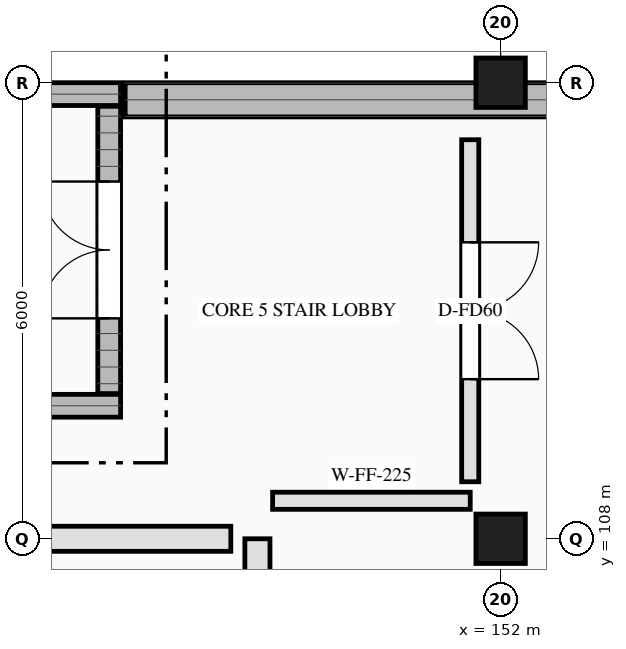
"""IFC4 building model, lengths in metres.
Left out: names, types, materials, properties, quantities, classifications, styles, units other than length and angle.
Written with IfcOpenShell. Run it as: python <this file> out.ifc"""

import sys

from ifc_helpers import new_model, si_unit, direction, frame, frame_2d, origin, origin_2d, place, context, subcontext, project, spatial, rectangle, extrude, element, fill, save


model = new_model("IFC4")
c1 = context("Model", 3, precision=1e-05, world=origin(), true_north=direction((0.0, 1.0)))
c2 = subcontext(c1, "Body", "Model", "MODEL_VIEW")
j1 = project(units=[si_unit("LENGTHUNIT", "METRE"), si_unit("PLANEANGLEUNIT", "RADIAN")], contexts=[c1])
p1 = place(None, origin())
s1 = spatial("IfcSite", under=j1, at=p1, CompositionType="ELEMENT")
p2 = place(p1, origin())
s2 = spatial("IfcBuilding", under=s1, at=p2, CompositionType="ELEMENT")
p3 = place(p2, frame((0.0, 0.0, -5.4)))
s3 = spatial("IfcBuildingStorey", under=s2, at=p3, CompositionType="ELEMENT", Elevation=-5.4)
p4 = place(p3, frame((147.06, 113.775, -0.4), z_axis=(0.0, 0.0, 1.0), x_axis=(1.0, 0.0, 0.0)))
e1 = element("IfcWall", 1, at=p4, inside=s3, PredefinedType="USERDEFINED", context=c2, shape_type="SweptSolid", body=[
    extrude(rectangle(XDim=20.715, YDim=0.45, at=frame_2d((10.357, 0.0))), origin(), (0.0, 0.0, 1.0), 5.5),
])
for number, where, z_axis, x_axis in (
    (2, (137.0, 109.75, -0.4), (0.0, 0.0, 1.0), (1.0, 0.0, 0.0)),
    (3, (137.0, 113.85, -0.4), (0.0, 0.0, 1.0), (1.0, 0.0, 0.0)),
):
    element("IfcWall", number, at=place(p3, frame(where, z_axis=z_axis, x_axis=x_axis)), inside=s3, PredefinedType="SHEAR", context=c2, shape_type="SweptSolid", body=[
        extrude(rectangle(XDim=10.0, YDim=0.3, at=frame_2d((5.0, 0.0))), origin(), (0.0, 0.0, 1.0), 5.8),
    ])
p5 = place(p3, frame((146.85, 109.91, -0.4), z_axis=(0.0, 0.0, 1.0), x_axis=(0.0, 1.0, 0.0)))
e4 = element("IfcWall", 4, at=p5, inside=s3, PredefinedType="SHEAR", context=c2, shape_type="SweptSolid", body=[
    extrude(rectangle(XDim=3.78, YDim=0.3, at=frame_2d((1.89, 0.0))), origin(), (0.0, 0.0, 1.0), 5.8),
])
p6 = place(p5, frame((0.99, 0.0, 0.4)))
e5 = element("IfcOpeningElement", 5, at=p6, cuts=e4, PredefinedType="OPENING", context=c2, shape_type="SweptSolid", body=[
    extrude(rectangle(XDim=1.8, YDim=2.2, at=frame_2d((0.9, 1.1))), frame((0.0, 0.16, 0.0), z_axis=(0.0, -1.0, 0.0), x_axis=(1.0, 0.0, 0.0)), (0.0, 0.0, 1.0), 0.32),
])
for number, where, z_axis, x_axis in (
    (6, (152.0, 108.0, -0.4), (0.0, 0.0, 1.0), (1.0, 0.0, 0.0)),
    (7, (152.0, 114.0, -0.4), (0.0, 0.0, 1.0), (1.0, 0.0, 0.0)),
):
    element("IfcColumn", number, at=place(p3, frame(where, z_axis=z_axis, x_axis=x_axis)), inside=s3, PredefinedType="COLUMN", context=c2, shape_type="SweptSolid", body=[
        extrude(rectangle(XDim=0.65, YDim=0.65, at=origin_2d()), origin(), (0.0, 0.0, 1.0), 5.8),
    ])
p7 = place(p3, frame((149.0, 108.5, 0.0), z_axis=(0.0, 0.0, 1.0), x_axis=(1.0, 0.0, 0.0)))
e8 = element("IfcWall", 8, at=p7, inside=s3, PredefinedType="SOLIDWALL", context=c2, shape_type="SweptSolid", body=[
    extrude(rectangle(XDim=2.6, YDim=0.225, at=frame_2d((1.3, 0.0))), origin(), (0.0, 0.0, 1.0), 5.025),
])
p8 = place(p3, frame((148.8, 79.0, 0.0), z_axis=(0.0, 0.0, 1.0), x_axis=(0.0, 1.0, 0.0)))
e9 = element("IfcWall", 9, at=p8, inside=s3, PredefinedType="SOLIDWALL", context=c2, shape_type="SweptSolid", body=[
    extrude(rectangle(XDim=29.0, YDim=0.33, at=frame_2d((14.5, 0.0))), origin(), (0.0, 0.0, 1.0), 5.025),
])
p9 = place(p8, frame((2.06, 0.0, 0.0)))
e10 = element("IfcOpeningElement", 10, at=p9, cuts=e9, PredefinedType="OPENING", context=c2, shape_type="SweptSolid", body=[
    extrude(rectangle(XDim=2.0, YDim=2.5, at=frame_2d((1.0, 1.25))), frame((0.0, 0.175, 0.0), z_axis=(0.0, -1.0, 0.0), x_axis=(1.0, 0.0, 0.0)), (0.0, 0.0, 1.0), 0.35),
])
p10 = place(p3, frame((151.6, 113.25, 0.0), z_axis=(0.0, 0.0, 1.0), x_axis=(0.0, -1.0, 0.0)))
e11 = element("IfcWall", 11, at=p10, inside=s3, PredefinedType="SOLIDWALL", context=c2, shape_type="SweptSolid", body=[
    extrude(rectangle(XDim=4.5, YDim=0.225, at=frame_2d((2.25, 0.0))), origin(), (0.0, 0.0, 1.0), 5.025),
])
p11 = place(p10, frame((1.35, 0.0, 0.0)))
e12 = element("IfcOpeningElement", 12, at=p11, cuts=e11, PredefinedType="OPENING", context=c2, shape_type="SweptSolid", body=[
    extrude(rectangle(XDim=1.8, YDim=2.2, at=frame_2d((0.9, 1.1))), frame((0.0, 0.123, 0.0), z_axis=(0.0, -1.0, 0.0), x_axis=(1.0, 0.0, 0.0)), (0.0, 0.0, 1.0), 0.245),
])
p12 = place(p3, frame((136.95, 108.0, 0.0), z_axis=(0.0, 0.0, 1.0), x_axis=(1.0, 0.0, 0.0)))
e13 = element("IfcWall", 13, at=p12, inside=s3, PredefinedType="SOLIDWALL", context=c2, shape_type="SweptSolid", body=[
    extrude(rectangle(XDim=11.5, YDim=0.33, at=frame_2d((5.75, 0.0))), origin(), (0.0, 0.0, 1.0), 4.625),
])
p13 = place(p6, origin())
e14 = element("IfcDoor", 14, at=p13, inside=s3, OperationType="DOUBLE_DOOR_SINGLE_SWING", PredefinedType="DOOR", context=c2, shape_type="SweptSolid", body=[
    extrude(rectangle(XDim=1.8, YDim=2.2, at=frame_2d((0.9, 1.1))), frame((0.0, 0.025, 0.0), z_axis=(0.0, -1.0, 0.0), x_axis=(1.0, 0.0, 0.0)), (0.0, 0.0, 1.0), 0.05),
])
fill(e5, e14)
p14 = place(p11, origin())
e15 = element("IfcDoor", 15, at=p14, inside=s3, OperationType="DOUBLE_DOOR_SINGLE_SWING", PredefinedType="DOOR", context=c2, shape_type="SweptSolid", body=[
    extrude(rectangle(XDim=1.8, YDim=2.2, at=frame_2d((0.9, 1.1))), frame((0.0, 0.025, 0.0), z_axis=(0.0, -1.0, 0.0), x_axis=(1.0, 0.0, 0.0)), (0.0, 0.0, 1.0), 0.05),
])
fill(e12, e15)
save(model, sys.argv[1])
